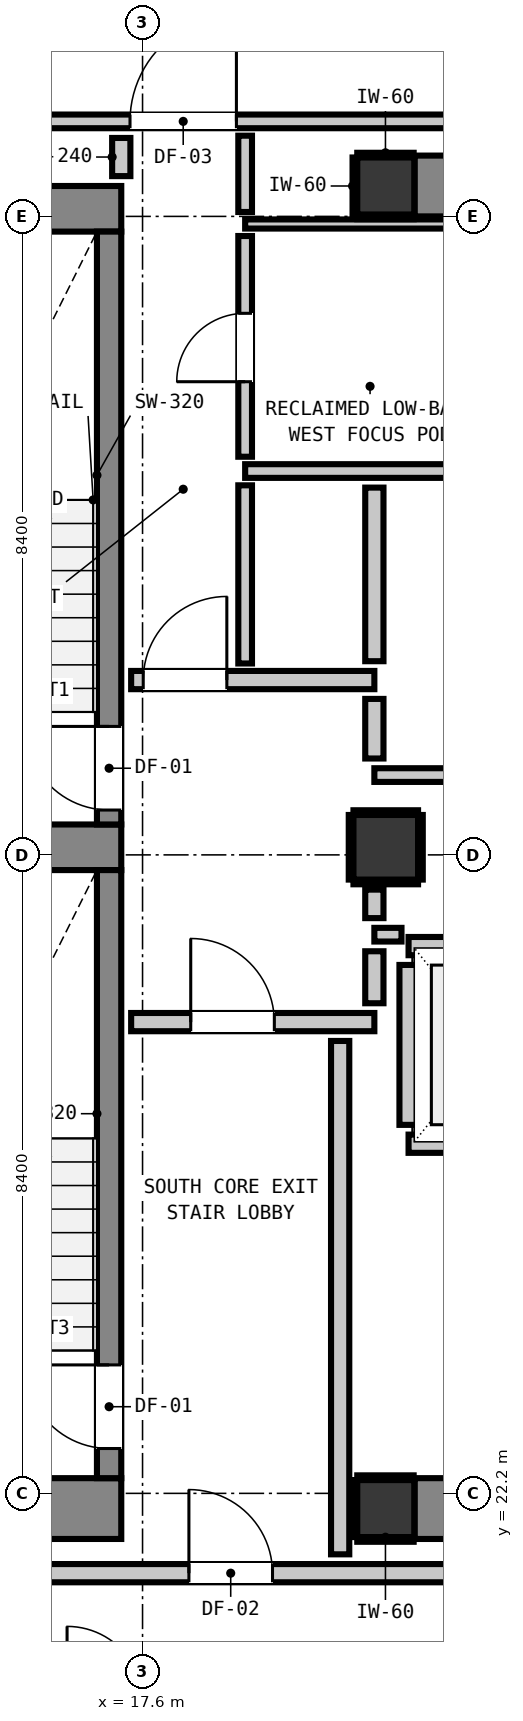
"""IFC4 building model, lengths in metres.
Left out: names, types, materials, properties, quantities, classifications, styles, units other than length and angle.
Written with IfcOpenShell. Run it as: python <this file> out.ifc"""

import sys

from ifc_helpers import new_model, si_unit, direction, frame, frame_2d, origin, origin_2d, place, context, subcontext, project, spatial, rectangle, extrude, element, fill, save


model = new_model("IFC4")
c1 = context("Model", 3, precision=1e-05, world=origin(), true_north=direction((0.0, 1.0)))
c2 = subcontext(c1, "Body", "Model", "MODEL_VIEW")
j1 = project(units=[si_unit("LENGTHUNIT", "METRE"), si_unit("PLANEANGLEUNIT", "RADIAN")], contexts=[c1])
p1 = place(None, origin())
s1 = spatial("IfcSite", under=j1, at=p1, CompositionType="ELEMENT")
p2 = place(p1, origin())
s2 = spatial("IfcBuilding", under=s1, at=p2, CompositionType="ELEMENT")
p3 = place(p2, frame((0.0, 0.0, 216.72)))
s3 = spatial("IfcBuildingStorey", under=s2, at=p3, CompositionType="ELEMENT", Elevation=216.72)
for number, where, z_axis, x_axis in (
    (1, (20.8, 22.0, 0.0), (0.0, 0.0, 1.0), (1.0, 0.0, 0.0)),
    (2, (20.8, 39.4, 0.0), (0.0, 0.0, 1.0), (1.0, 0.0, 0.0)),
):
    element("IfcColumn", number, at=place(p3, frame(where, z_axis=z_axis, x_axis=x_axis)), inside=s3, PredefinedType="COLUMN", context=c2, shape_type="SweptSolid", body=[
        extrude(rectangle(XDim=0.75, YDim=0.75, at=origin_2d()), origin(), (0.0, 0.0, 1.0), 3.32),
    ])
p4 = place(p3, frame((13.24, 22.0, 0.0), z_axis=(0.0, 0.0, 1.0), x_axis=(1.0, 0.0, 0.0)))
e3 = element("IfcWall", 3, at=p4, inside=s3, PredefinedType="SHEAR", context=c2, shape_type="SweptSolid", body=[
    extrude(rectangle(XDim=4.08, YDim=0.8, at=frame_2d((2.04, 0.0))), origin(), (0.0, 0.0, 1.0), 3.32),
])
p5 = place(p3, frame((13.24, 39.1, 0.0), z_axis=(0.0, 0.0, 1.0), x_axis=(1.0, 0.0, 0.0)))
e4 = element("IfcWall", 4, at=p5, inside=s3, PredefinedType="SHEAR", context=c2, shape_type="SweptSolid", body=[
    extrude(rectangle(XDim=4.08, YDim=0.6, at=frame_2d((2.04, 0.0))), origin(), (0.0, 0.0, 1.0), 3.32),
])
p6 = place(p3, frame((13.78, 30.7, 0.0), z_axis=(0.0, 0.0, 1.0), x_axis=(1.0, 0.0, 0.0)))
e5 = element("IfcWall", 5, at=p6, inside=s3, PredefinedType="SHEAR", context=c2, shape_type="SweptSolid", body=[
    extrude(rectangle(XDim=3.54, YDim=0.6, at=frame_2d((1.77, 0.0))), origin(), (0.0, 0.0, 1.0), 3.32),
])
for number, where, z_axis, x_axis in (
    (6, (21.18, 22.0, 0.0), (0.0, 0.0, 1.0), (1.0, 0.0, 0.0)),
    (7, (21.18, 39.4, 0.0), (0.0, 0.0, 1.0), (1.0, 0.0, 0.0)),
):
    element("IfcWall", number, at=place(p3, frame(where, z_axis=z_axis, x_axis=x_axis)), inside=s3, PredefinedType="SHEAR", context=c2, shape_type="SweptSolid", body=[
        extrude(rectangle(XDim=7.64, YDim=0.8, at=frame_2d((3.82, 0.0))), origin(), (0.0, 0.0, 1.0), 3.32),
    ])
p7 = place(p3, frame((17.16, 31.0, 0.0), z_axis=(0.0, 0.0, 1.0), x_axis=(0.0, 1.0, 0.0)))
e8 = element("IfcWall", 8, at=p7, inside=s3, PredefinedType="SHEAR", context=c2, shape_type="SweptSolid", body=[
    extrude(rectangle(XDim=7.8, YDim=0.32, at=frame_2d((3.9, 0.0))), origin(), (0.0, 0.0, 1.0), 3.32),
])
p8 = place(p7, frame((0.19, 0.0, 0.0)))
e9 = element("IfcOpeningElement", 9, at=p8, cuts=e8, PredefinedType="OPENING", context=c2, shape_type="SweptSolid", body=[
    extrude(rectangle(XDim=1.1, YDim=2.15, at=frame_2d((0.55, 1.075))), frame((0.0, 0.17, 0.0), z_axis=(0.0, -1.0, 0.0), x_axis=(1.0, 0.0, 0.0)), (0.0, 0.0, 1.0), 0.34),
])
p9 = place(p3, frame((17.16, 22.4, 0.0), z_axis=(0.0, 0.0, 1.0), x_axis=(0.0, 1.0, 0.0)))
e10 = element("IfcWall", 10, at=p9, inside=s3, PredefinedType="SHEAR", context=c2, shape_type="SweptSolid", body=[
    extrude(rectangle(XDim=8.0, YDim=0.32, at=frame_2d((4.0, 0.0))), origin(), (0.0, 0.0, 1.0), 3.32),
])
p10 = place(p9, frame((0.39, 0.0, 0.0)))
e11 = element("IfcOpeningElement", 11, at=p10, cuts=e10, PredefinedType="OPENING", context=c2, shape_type="SweptSolid", body=[
    extrude(rectangle(XDim=1.1, YDim=2.15, at=frame_2d((0.55, 1.075))), frame((0.0, 0.17, 0.0), z_axis=(0.0, -1.0, 0.0), x_axis=(1.0, 0.0, 0.0)), (0.0, 0.0, 1.0), 0.34),
])
p11 = place(p3, frame((20.8, 30.7, 0.0), z_axis=(0.0, 0.0, 1.0), x_axis=(1.0, 0.0, 0.0)))
e12 = element("IfcColumn", 12, at=p11, inside=s3, PredefinedType="COLUMN", context=c2, shape_type="SweptSolid", body=[
    extrude(rectangle(XDim=0.85, YDim=0.85, at=origin_2d()), origin(), (0.0, 0.0, 1.0), 3.32),
])
for number, where, z_axis, x_axis in (
    (13, (21.1, 26.8, 0.0), (0.0, 0.0, 1.0), (1.0, 0.0, 0.0)),
    (14, (21.1, 29.4, 0.0), (0.0, 0.0, 1.0), (1.0, 0.0, 0.0)),
):
    element("IfcWall", number, at=place(p3, frame(where, z_axis=z_axis, x_axis=x_axis)), inside=s3, PredefinedType="PARTITIONING", context=c2, shape_type="SweptSolid", body=[
        extrude(rectangle(XDim=2.2, YDim=0.24, at=frame_2d((1.1, 0.0))), origin(), (0.0, 0.0, 1.0), 3.1),
    ])
p12 = place(p3, frame((21.1, 27.048, 0.0), z_axis=(0.0, 0.0, 1.0), x_axis=(0.0, 1.0, 0.0)))
e15 = element("IfcWall", 15, at=p12, inside=s3, PredefinedType="PARTITIONING", context=c2, shape_type="SweptSolid", body=[
    extrude(rectangle(XDim=2.104, YDim=0.24, at=frame_2d((1.052, 0.0))), origin(), (0.0, 0.0, 1.0), 2.335),
])
p13 = place(p3, frame((10.787, 21.15, 0.0), z_axis=(0.0, 0.0, 1.0), x_axis=(1.0, 0.0, 0.0)))
e16 = element("IfcWall", 16, at=p13, inside=s3, PredefinedType="PARTITIONING", context=c2, shape_type="SweptSolid", body=[
    extrude(rectangle(XDim=36.626, YDim=0.24, at=frame_2d((18.313, 0.0))), origin(), (0.0, 0.0, 1.0), 3.1),
])
p14 = place(p13, frame((7.423, 0.0, 0.0)))
e17 = element("IfcOpeningElement", 17, at=p14, cuts=e16, PredefinedType="OPENING", context=c2, shape_type="SweptSolid", body=[
    extrude(rectangle(XDim=1.1, YDim=2.15, at=frame_2d((0.55, 1.075))), frame((0.0, 0.13, 0.0), z_axis=(0.0, -1.0, 0.0), x_axis=(1.0, 0.0, 0.0)), (0.0, 0.0, 1.0), 0.26),
])
p15 = place(p13, frame((31.314, 0.0, 0.0)))
e18 = element("IfcOpeningElement", 18, at=p15, cuts=e16, PredefinedType="OPENING", context=c2, shape_type="SweptSolid", body=[
    extrude(rectangle(XDim=0.9, YDim=2.1, at=frame_2d((0.45, 1.05))), frame((0.0, 0.13, 0.0), z_axis=(0.0, -1.0, 0.0), x_axis=(1.0, 0.0, 0.0)), (0.0, 0.0, 1.0), 0.26),
])
p16 = place(p3, frame((17.45, 28.4, 0.0), z_axis=(0.0, 0.0, 1.0), x_axis=(1.0, 0.0, 0.0)))
e19 = element("IfcWall", 19, at=p16, inside=s3, PredefinedType="PARTITIONING", context=c2, shape_type="SweptSolid", body=[
    extrude(rectangle(XDim=3.2, YDim=0.24, at=frame_2d((1.6, 0.0))), origin(), (0.0, 0.0, 1.0), 3.1),
])
p17 = place(p16, frame((0.784, 0.0, 0.0)))
e20 = element("IfcOpeningElement", 20, at=p17, cuts=e19, PredefinedType="OPENING", context=c2, shape_type="SweptSolid", body=[
    extrude(rectangle(XDim=1.1, YDim=2.15, at=frame_2d((0.55, 1.075))), frame((0.0, 0.13, 0.0), z_axis=(0.0, -1.0, 0.0), x_axis=(1.0, 0.0, 0.0)), (0.0, 0.0, 1.0), 0.26),
])
p18 = place(p3, frame((17.45, 32.9, 0.0), z_axis=(0.0, 0.0, 1.0), x_axis=(1.0, 0.0, 0.0)))
e21 = element("IfcWall", 21, at=p18, inside=s3, PredefinedType="PARTITIONING", context=c2, shape_type="SweptSolid", body=[
    extrude(rectangle(XDim=3.2, YDim=0.24, at=frame_2d((1.6, 0.0))), origin(), (0.0, 0.0, 1.0), 3.1),
])
p19 = place(p18, frame((0.159, 0.0, 0.0)))
e22 = element("IfcOpeningElement", 22, at=p19, cuts=e21, PredefinedType="OPENING", context=c2, shape_type="SweptSolid", body=[
    extrude(rectangle(XDim=1.1, YDim=2.15, at=frame_2d((0.55, 1.075))), frame((0.0, 0.13, 0.0), z_axis=(0.0, -1.0, 0.0), x_axis=(1.0, 0.0, 0.0)), (0.0, 0.0, 1.0), 0.26),
])
p20 = place(p3, frame((20.65, 29.55, 0.0), z_axis=(0.0, 0.0, 1.0), x_axis=(1.0, 0.0, 0.0)))
e23 = element("IfcWall", 23, at=p20, inside=s3, PredefinedType="PARTITIONING", context=c2, shape_type="SweptSolid", body=[
    extrude(rectangle(XDim=0.357, YDim=0.18, at=frame_2d((0.179, 0.0))), origin(), (0.0, 0.0, 1.0), 3.1),
])
p21 = place(p3, frame((20.65, 31.65, 0.0), z_axis=(0.0, 0.0, 1.0), x_axis=(1.0, 0.0, 0.0)))
e24 = element("IfcWall", 24, at=p21, inside=s3, PredefinedType="PARTITIONING", context=c2, shape_type="SweptSolid", body=[
    extrude(rectangle(XDim=7.7, YDim=0.18, at=frame_2d((3.85, 0.0))), origin(), (0.0, 0.0, 1.0), 3.1),
])
p22 = place(p21, frame((1.924, 0.0, 0.0)))
e25 = element("IfcOpeningElement", 25, at=p22, cuts=e24, PredefinedType="OPENING", context=c2, shape_type="SweptSolid", body=[
    extrude(rectangle(XDim=0.9, YDim=2.1, at=frame_2d((0.45, 1.05))), frame((0.0, 0.1, 0.0), z_axis=(0.0, -1.0, 0.0), x_axis=(1.0, 0.0, 0.0)), (0.0, 0.0, 1.0), 0.2),
])
p23 = place(p3, frame((18.95, 35.65, 0.0), z_axis=(0.0, 0.0, 1.0), x_axis=(1.0, 0.0, 0.0)))
e26 = element("IfcWall", 26, at=p23, inside=s3, PredefinedType="PARTITIONING", context=c2, shape_type="SweptSolid", body=[
    extrude(rectangle(XDim=11.025, YDim=0.18, at=frame_2d((5.513, 0.0))), origin(), (0.0, 0.0, 1.0), 3.1),
])
p24 = place(p3, frame((10.787, 40.25, 0.0), z_axis=(0.0, 0.0, 1.0), x_axis=(1.0, 0.0, 0.0)))
e27 = element("IfcWall", 27, at=p24, inside=s3, PredefinedType="PARTITIONING", context=c2, shape_type="SweptSolid", body=[
    extrude(rectangle(XDim=26.102, YDim=0.18, at=frame_2d((13.051, 0.0))), origin(), (0.0, 0.0, 1.0), 3.1),
])
p25 = place(p24, frame((6.648, 0.0, 0.0)))
e28 = element("IfcOpeningElement", 28, at=p25, cuts=e27, PredefinedType="OPENING", context=c2, shape_type="SweptSolid", body=[
    extrude(rectangle(XDim=1.4, YDim=2.15, at=frame_2d((0.7, 1.075))), frame((0.0, 0.1, 0.0), z_axis=(0.0, -1.0, 0.0), x_axis=(1.0, 0.0, 0.0)), (0.0, 0.0, 1.0), 0.2),
])
p26 = place(p3, frame((18.95, 38.9, 0.0), z_axis=(0.0, 0.0, 1.0), x_axis=(1.0, 0.0, 0.0)))
e29 = element("IfcWall", 29, at=p26, inside=s3, PredefinedType="PARTITIONING", context=c2, shape_type="SweptSolid", body=[
    extrude(rectangle(XDim=11.025, YDim=0.12, at=frame_2d((5.513, 0.0))), origin(), (0.0, 0.0, 1.0), 3.1),
])
p27 = place(p3, frame((17.32, 39.53, 0.0), z_axis=(0.0, 0.0, 1.0), x_axis=(0.0, 1.0, 0.0)))
e30 = element("IfcWall", 30, at=p27, inside=s3, PredefinedType="PARTITIONING", context=c2, shape_type="SweptSolid", body=[
    extrude(rectangle(XDim=0.502, YDim=0.24, at=frame_2d((0.251, 0.0))), origin(), (0.0, 0.0, 1.0), 3.1),
])
p28 = place(p3, frame((20.2, 21.398, 0.0), z_axis=(0.0, 0.0, 1.0), x_axis=(0.0, 1.0, 0.0)))
e31 = element("IfcWall", 31, at=p28, inside=s3, PredefinedType="PARTITIONING", context=c2, shape_type="SweptSolid", body=[
    extrude(rectangle(XDim=6.754, YDim=0.24, at=frame_2d((3.377, 0.0))), origin(), (0.0, 0.0, 1.0), 3.1),
])
p29 = place(p3, frame((20.65, 28.648, 0.0), z_axis=(0.0, 0.0, 1.0), x_axis=(0.0, 1.0, 0.0)))
e32 = element("IfcWall", 32, at=p29, inside=s3, PredefinedType="PARTITIONING", context=c2, shape_type="SweptSolid", body=[
    extrude(rectangle(XDim=0.684, YDim=0.24, at=frame_2d((0.342, 0.0))), origin(), (0.0, 0.0, 1.0), 2.335),
])
p30 = place(p3, frame((20.65, 29.768, 0.0), z_axis=(0.0, 0.0, 1.0), x_axis=(0.0, 1.0, 0.0)))
e33 = element("IfcWall", 33, at=p30, inside=s3, PredefinedType="PARTITIONING", context=c2, shape_type="SweptSolid", body=[
    extrude(rectangle(XDim=0.375, YDim=0.24, at=frame_2d((0.188, 0.0))), origin(), (0.0, 0.0, 1.0), 2.335),
])
p31 = place(p3, frame((20.65, 31.868, 0.0), z_axis=(0.0, 0.0, 1.0), x_axis=(0.0, 1.0, 0.0)))
e34 = element("IfcWall", 34, at=p31, inside=s3, PredefinedType="PARTITIONING", context=c2, shape_type="SweptSolid", body=[
    extrude(rectangle(XDim=0.784, YDim=0.24, at=frame_2d((0.392, 0.0))), origin(), (0.0, 0.0, 1.0), 2.335),
])
p32 = place(p3, frame((20.65, 33.148, 0.0), z_axis=(0.0, 0.0, 1.0), x_axis=(0.0, 1.0, 0.0)))
e35 = element("IfcWall", 35, at=p32, inside=s3, PredefinedType="PARTITIONING", context=c2, shape_type="SweptSolid", body=[
    extrude(rectangle(XDim=2.284, YDim=0.24, at=frame_2d((1.142, 0.0))), origin(), (0.0, 0.0, 1.0), 2.335),
])
p33 = place(p3, frame((18.95, 33.118, 0.0), z_axis=(0.0, 0.0, 1.0), x_axis=(0.0, 1.0, 0.0)))
e36 = element("IfcWall", 36, at=p33, inside=s3, PredefinedType="PARTITIONING", context=c2, shape_type="SweptSolid", body=[
    extrude(rectangle(XDim=2.344, YDim=0.18, at=frame_2d((1.172, 0.0))), origin(), (0.0, 0.0, 1.0), 3.1),
])
p34 = place(p3, frame((18.95, 35.838, 0.0), z_axis=(0.0, 0.0, 1.0), x_axis=(0.0, 1.0, 0.0)))
e37 = element("IfcWall", 37, at=p34, inside=s3, PredefinedType="PARTITIONING", context=c2, shape_type="SweptSolid", body=[
    extrude(rectangle(XDim=2.904, YDim=0.18, at=frame_2d((1.452, 0.0))), origin(), (0.0, 0.0, 1.0), 3.1),
])
p35 = place(p34, frame((0.987, 0.0, 0.0)))
e38 = element("IfcOpeningElement", 38, at=p35, cuts=e37, PredefinedType="OPENING", context=c2, shape_type="SweptSolid", body=[
    extrude(rectangle(XDim=0.9, YDim=2.1, at=frame_2d((0.45, 1.05))), frame((0.0, 0.1, 0.0), z_axis=(0.0, -1.0, 0.0), x_axis=(1.0, 0.0, 0.0)), (0.0, 0.0, 1.0), 0.2),
])
p36 = place(p3, frame((18.95, 39.058, 0.0), z_axis=(0.0, 0.0, 1.0), x_axis=(0.0, 1.0, 0.0)))
e39 = element("IfcWall", 39, at=p36, inside=s3, PredefinedType="PARTITIONING", context=c2, shape_type="SweptSolid", body=[
    extrude(rectangle(XDim=1.004, YDim=0.18, at=frame_2d((0.502, 0.0))), origin(), (0.0, 0.0, 1.0), 3.1),
])
for number, where, z_axis, x_axis in (
    (40, (20.425, 21.593, 0.0), (0.0, 0.0, 1.0), (1.0, 0.0, 0.0)),
    (41, (20.425, 22.407, 0.0), (0.0, 0.0, 1.0), (1.0, 0.0, 0.0)),
):
    element("IfcWall", number, at=place(p3, frame(where, z_axis=z_axis, x_axis=x_axis)), inside=s3, PredefinedType="PARTITIONING", context=c2, shape_type="SweptSolid", body=[
        extrude(rectangle(XDim=0.742, YDim=0.06, at=frame_2d((0.371, 0.0))), origin(), (0.0, 0.0, 1.0), 1.45),
    ])
p37 = place(p3, frame((20.393, 21.625, 0.0), z_axis=(0.0, 0.0, 1.0), x_axis=(0.0, 1.0, 0.0)))
e42 = element("IfcWall", 42, at=p37, inside=s3, PredefinedType="PARTITIONING", context=c2, shape_type="SweptSolid", body=[
    extrude(rectangle(XDim=0.75, YDim=0.06, at=frame_2d((0.375, 0.0))), origin(), (0.0, 0.0, 1.0), 1.45),
])
for number, where, z_axis, x_axis in (
    (43, (20.425, 38.993, 0.0), (0.0, 0.0, 1.0), (1.0, 0.0, 0.0)),
    (44, (20.425, 39.807, 0.0), (0.0, 0.0, 1.0), (1.0, 0.0, 0.0)),
):
    element("IfcWall", number, at=place(p3, frame(where, z_axis=z_axis, x_axis=x_axis)), inside=s3, PredefinedType="PARTITIONING", context=c2, shape_type="SweptSolid", body=[
        extrude(rectangle(XDim=0.742, YDim=0.06, at=frame_2d((0.371, 0.0))), origin(), (0.0, 0.0, 1.0), 1.45),
    ])
p38 = place(p3, frame((20.393, 39.025, 0.0), z_axis=(0.0, 0.0, 1.0), x_axis=(0.0, 1.0, 0.0)))
e45 = element("IfcWall", 45, at=p38, inside=s3, PredefinedType="PARTITIONING", context=c2, shape_type="SweptSolid", body=[
    extrude(rectangle(XDim=0.75, YDim=0.06, at=frame_2d((0.375, 0.0))), origin(), (0.0, 0.0, 1.0), 1.45),
])
for number, where, z_axis, x_axis in (
    (46, (20.375, 30.243, 0.0), (0.0, 0.0, 1.0), (1.0, 0.0, 0.0)),
    (47, (20.375, 31.157, 0.0), (0.0, 0.0, 1.0), (1.0, 0.0, 0.0)),
    (48, (20.343, 30.275, 0.0), (0.0, 0.0, 1.0), (0.0, 1.0, 0.0)),
    (49, (21.257, 30.275, 0.0), (0.0, 0.0, 1.0), (0.0, 1.0, 0.0)),
):
    element("IfcWall", number, at=place(p3, frame(where, z_axis=z_axis, x_axis=x_axis)), inside=s3, PredefinedType="PARTITIONING", context=c2, shape_type="SweptSolid", body=[
        extrude(rectangle(XDim=0.85, YDim=0.06, at=frame_2d((0.425, 0.0))), origin(), (0.0, 0.0, 1.0), 1.45),
    ])
p39 = place(p8, origin())
e50 = element("IfcDoor", 50, at=p39, inside=s3, OperationType="SINGLE_SWING_RIGHT", PredefinedType="DOOR", context=c2, shape_type="SweptSolid", body=[
    extrude(rectangle(XDim=1.1, YDim=2.15, at=frame_2d((0.55, 1.075))), frame((0.0, 0.025, 0.0), z_axis=(0.0, -1.0, 0.0), x_axis=(1.0, 0.0, 0.0)), (0.0, 0.0, 1.0), 0.05),
])
fill(e9, e50)
p40 = place(p10, origin())
e51 = element("IfcDoor", 51, at=p40, inside=s3, OperationType="SINGLE_SWING_RIGHT", PredefinedType="DOOR", context=c2, shape_type="SweptSolid", body=[
    extrude(rectangle(XDim=1.1, YDim=2.15, at=frame_2d((0.55, 1.075))), frame((0.0, 0.025, 0.0), z_axis=(0.0, -1.0, 0.0), x_axis=(1.0, 0.0, 0.0)), (0.0, 0.0, 1.0), 0.05),
])
fill(e11, e51)
p41 = place(p17, origin())
e52 = element("IfcDoor", 52, at=p41, inside=s3, OperationType="SINGLE_SWING_LEFT", PredefinedType="DOOR", context=c2, shape_type="SweptSolid", body=[
    extrude(rectangle(XDim=1.1, YDim=2.15, at=frame_2d((0.55, 1.075))), frame((0.0, 0.025, 0.0), z_axis=(0.0, -1.0, 0.0), x_axis=(1.0, 0.0, 0.0)), (0.0, 0.0, 1.0), 0.05),
])
fill(e20, e52)
p42 = place(p19, origin())
e53 = element("IfcDoor", 53, at=p42, inside=s3, OperationType="SINGLE_SWING_RIGHT", PredefinedType="DOOR", context=c2, shape_type="SweptSolid", body=[
    extrude(rectangle(XDim=1.1, YDim=2.15, at=frame_2d((0.55, 1.075))), frame((0.0, 0.025, 0.0), z_axis=(0.0, -1.0, 0.0), x_axis=(1.0, 0.0, 0.0)), (0.0, 0.0, 1.0), 0.05),
])
fill(e22, e53)
p43 = place(p14, origin())
e54 = element("IfcDoor", 54, at=p43, inside=s3, OperationType="SINGLE_SWING_LEFT", PredefinedType="DOOR", context=c2, shape_type="SweptSolid", body=[
    extrude(rectangle(XDim=1.1, YDim=2.15, at=frame_2d((0.55, 1.075))), frame((0.0, 0.025, 0.0), z_axis=(0.0, -1.0, 0.0), x_axis=(1.0, 0.0, 0.0)), (0.0, 0.0, 1.0), 0.05),
])
fill(e17, e54)
p44 = place(p25, origin())
e55 = element("IfcDoor", 55, at=p44, inside=s3, OperationType="SINGLE_SWING_RIGHT", PredefinedType="DOOR", context=c2, shape_type="SweptSolid", body=[
    extrude(rectangle(XDim=1.4, YDim=2.15, at=frame_2d((0.7, 1.075))), frame((0.0, 0.025, 0.0), z_axis=(0.0, -1.0, 0.0), x_axis=(1.0, 0.0, 0.0)), (0.0, 0.0, 1.0), 0.05),
])
fill(e28, e55)
p45 = place(p35, origin())
e56 = element("IfcDoor", 56, at=p45, inside=s3, OperationType="SINGLE_SWING_LEFT", PredefinedType="DOOR", context=c2, shape_type="SweptSolid", body=[
    extrude(rectangle(XDim=0.9, YDim=2.1, at=frame_2d((0.45, 1.05))), frame((0.0, 0.025, 0.0), z_axis=(0.0, -1.0, 0.0), x_axis=(1.0, 0.0, 0.0)), (0.0, 0.0, 1.0), 0.05),
])
fill(e38, e56)
save(model, sys.argv[1])
